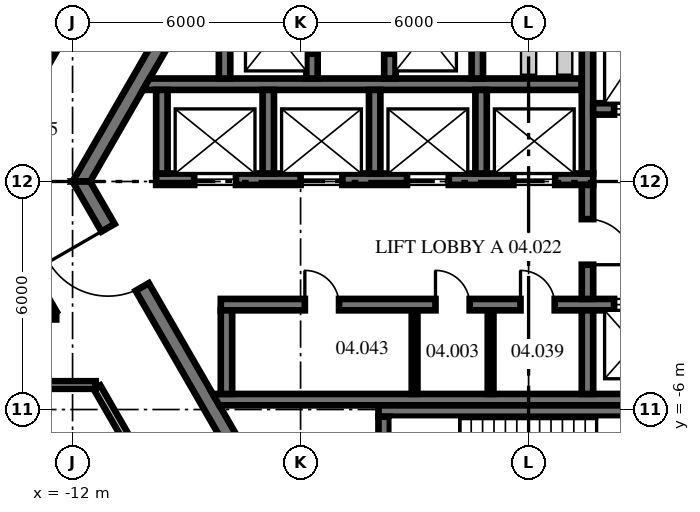
"""IFC4 building model, lengths in metres.
Left out: names, types, materials, properties, quantities, classifications, styles, units other than length and angle.
Written with IfcOpenShell. Run it as: python <this file> out.ifc"""

import sys

from ifc_helpers import new_model, si_unit, direction, frame, frame_2d, origin, place, context, subcontext, project, spatial, polyline, rectangle, outline, extrude, source, transform, mapped, element, fill, save


model = new_model("IFC4")
c1 = context("Model", 3, precision=1e-05, world=origin(), true_north=direction((0.0, 1.0)))
c2 = subcontext(c1, "Body", "Model", "MODEL_VIEW")
j1 = project(units=[si_unit("LENGTHUNIT", "METRE"), si_unit("PLANEANGLEUNIT", "RADIAN")], contexts=[c1])
p1 = place(None, origin())
s1 = spatial("IfcSite", under=j1, at=p1, CompositionType="ELEMENT")
p2 = place(p1, origin())
s2 = spatial("IfcBuilding", under=s1, at=p2, CompositionType="ELEMENT")
p3 = place(p2, frame((0.0, 0.0, 20.3)))
s3 = spatial("IfcBuildingStorey", under=s2, at=p3, CompositionType="ELEMENT", Elevation=20.3)
m1 = source(origin(), c2, "Body", "SweptSolid", [
    extrude(outline(polyline([(-0.115, -0.2), (11.885, -0.2), (11.654, 0.2), (0.115, 0.2), (-0.115, -0.2)])), origin(), (0.0, 0.0, 1.0), 4.1),
])
p4 = place(p3, frame((-5.885, 10.192, 0.0), z_axis=(0.0, 0.0, 1.0), x_axis=(-0.499996592174, -0.866027371285, 0.0)))
e1 = element("IfcWall", 1, at=p4, inside=s3, PredefinedType="SHEAR", context=c2, shape_type="MappedRepresentation", body=[
    mapped(m1, transform((0.0, 0.0, 0.0), scale=1.0)),
])
p5 = place(p4, frame((3.185, 0.0, 0.0)))
e2 = element("IfcOpeningElement", 2, at=p5, cuts=e1, PredefinedType="OPENING", context=c2, shape_type="SweptSolid", body=[
    extrude(rectangle(XDim=1.2, YDim=2.1, at=frame_2d((0.6, 1.05))), frame((0.0, 0.21, 0.0), z_axis=(0.0, -1.0, 0.0), x_axis=(1.0, 0.0, 0.0)), (0.0, 0.0, 1.0), 0.42),
])
p6 = place(p3, frame((-11.769, 0.0, 0.0), z_axis=(0.0, 0.0, 1.0), x_axis=(0.499996592174, -0.866027371285, 0.0)))
e3 = element("IfcWall", 3, at=p6, inside=s3, PredefinedType="SHEAR", context=c2, shape_type="MappedRepresentation", body=[
    mapped(m1, transform((0.0, 0.0, 0.0), scale=1.0)),
])
p7 = place(p6, frame((1.405, 0.0, 0.0)))
e4 = element("IfcOpeningElement", 4, at=p7, cuts=e3, PredefinedType="OPENING", context=c2, shape_type="SweptSolid", body=[
    extrude(rectangle(XDim=1.8, YDim=2.1, at=frame_2d((0.9, 1.05))), frame((0.0, 0.21, 0.0), z_axis=(0.0, -1.0, 0.0), x_axis=(1.0, 0.0, 0.0)), (0.0, 0.0, 1.0), 0.42),
])
p8 = place(p6, frame((7.915, 0.0, 0.0)))
e5 = element("IfcOpeningElement", 5, at=p8, cuts=e3, PredefinedType="OPENING", context=c2, shape_type="SweptSolid", body=[
    extrude(rectangle(XDim=1.2, YDim=2.1, at=frame_2d((0.6, 1.05))), frame((0.0, 0.21, 0.0), z_axis=(0.0, -1.0, 0.0), x_axis=(1.0, 0.0, 0.0)), (0.0, 0.0, 1.0), 0.42),
])
m2 = source(origin(), c2, "Body", "SweptSolid", [
    extrude(rectangle(XDim=11.5, YDim=0.3, at=frame_2d((5.75, 0.0))), origin(), (0.0, 0.0, 1.0), 4.1),
])
p9 = place(p3, frame((-9.8, 0.06, 0.0), z_axis=(0.0, 0.0, 1.0), x_axis=(1.0, 0.0, 0.0)))
e6 = element("IfcWall", 6, at=p9, inside=s3, PredefinedType="SHEAR", context=c2, shape_type="MappedRepresentation", body=[
    mapped(m2, transform((0.0, 0.0, 0.0), scale=1.0)),
])
p10 = place(p9, frame((1.0, 0.0, 0.0)))
e7 = element("IfcOpeningElement", 7, at=p10, cuts=e6, PredefinedType="OPENING", context=c2, shape_type="SweptSolid", body=[
    extrude(rectangle(XDim=1.1, YDim=2.1, at=frame_2d((0.55, 1.05))), frame((0.0, 0.16, 0.0), z_axis=(0.0, -1.0, 0.0), x_axis=(1.0, 0.0, 0.0)), (0.0, 0.0, 1.0), 0.32),
])
p11 = place(p9, frame((3.8, 0.0, 0.0)))
e8 = element("IfcOpeningElement", 8, at=p11, cuts=e6, PredefinedType="OPENING", context=c2, shape_type="SweptSolid", body=[
    extrude(rectangle(XDim=1.1, YDim=2.1, at=frame_2d((0.55, 1.05))), frame((0.0, 0.16, 0.0), z_axis=(0.0, -1.0, 0.0), x_axis=(1.0, 0.0, 0.0)), (0.0, 0.0, 1.0), 0.32),
])
p12 = place(p9, frame((6.6, 0.0, 0.0)))
e9 = element("IfcOpeningElement", 9, at=p12, cuts=e6, PredefinedType="OPENING", context=c2, shape_type="SweptSolid", body=[
    extrude(rectangle(XDim=1.1, YDim=2.1, at=frame_2d((0.55, 1.05))), frame((0.0, 0.16, 0.0), z_axis=(0.0, -1.0, 0.0), x_axis=(1.0, 0.0, 0.0)), (0.0, 0.0, 1.0), 0.32),
])
p13 = place(p9, frame((9.4, 0.0, 0.0)))
e10 = element("IfcOpeningElement", 10, at=p13, cuts=e6, PredefinedType="OPENING", context=c2, shape_type="SweptSolid", body=[
    extrude(rectangle(XDim=1.1, YDim=2.1, at=frame_2d((0.55, 1.05))), frame((0.0, 0.16, 0.0), z_axis=(0.0, -1.0, 0.0), x_axis=(1.0, 0.0, 0.0)), (0.0, 0.0, 1.0), 0.32),
])
m3 = source(origin(), c2, "Body", "SweptSolid", [
    extrude(outline(polyline([(11.2, -0.15), (-0.349, -0.15), (-0.176, 0.15), (11.2, 0.15), (11.2, -0.15)])), origin(), (0.0, 0.0, 1.0), 4.1),
])
p14 = place(p3, frame((-9.8, 2.56, 0.0), z_axis=(0.0, 0.0, 1.0), x_axis=(1.0, 0.0, 0.0)))
e11 = element("IfcWall", 11, at=p14, inside=s3, PredefinedType="SHEAR", context=c2, shape_type="MappedRepresentation", body=[
    mapped(m3, transform((0.0, 0.0, 0.0), scale=1.0)),
])
m4 = source(origin(), c2, "Body", "SweptSolid", [
    extrude(rectangle(XDim=4.45, YDim=0.3, at=frame_2d((2.225, 0.0))), origin(), (0.0, 0.0, 1.0), 4.1),
])
p15 = place(p3, frame((1.55, 0.21, 0.0), z_axis=(0.0, 0.0, 1.0), x_axis=(0.0, 1.0, 0.0)))
e12 = element("IfcWall", 12, at=p15, inside=s3, PredefinedType="SHEAR", context=c2, shape_type="MappedRepresentation", body=[
    mapped(m4, transform((0.0, 0.0, 0.0), scale=1.0)),
])
m5 = source(origin(), c2, "Body", "SweptSolid", [
    extrude(rectangle(XDim=3.0, YDim=0.3, at=frame_2d((1.5, 0.0))), origin(), (0.0, 0.0, 1.0), 4.1),
])
p16 = place(p3, frame((1.7, 1.91, 0.0), z_axis=(0.0, 0.0, 1.0), x_axis=(1.0, 0.0, 0.0)))
e13 = element("IfcWall", 13, at=p16, inside=s3, PredefinedType="SHEAR", context=c2, shape_type="MappedRepresentation", body=[
    mapped(m5, transform((0.0, 0.0, 0.0), scale=1.0)),
])
p17 = place(p16, frame((0.55, 0.0, 0.0)))
e14 = element("IfcOpeningElement", 14, at=p17, cuts=e13, PredefinedType="OPENING", context=c2, shape_type="SweptSolid", body=[
    extrude(rectangle(XDim=1.1, YDim=2.1, at=frame_2d((0.55, 1.05))), frame((0.0, 0.16, 0.0), z_axis=(0.0, -1.0, 0.0), x_axis=(1.0, 0.0, 0.0)), (0.0, 0.0, 1.0), 0.32),
])
m6 = source(origin(), c2, "Body", "SweptSolid", [
    extrude(rectangle(XDim=12.8, YDim=0.3, at=frame_2d((6.4, 0.0))), origin(), (0.0, 0.0, 1.0), 4.1),
])
p18 = place(p3, frame((-8.1, -3.24, 0.0), z_axis=(0.0, 0.0, 1.0), x_axis=(1.0, 0.0, 0.0)))
e15 = element("IfcWall", 15, at=p18, inside=s3, PredefinedType="SHEAR", context=c2, shape_type="MappedRepresentation", body=[
    mapped(m6, transform((0.0, 0.0, 0.0), scale=1.0)),
])
p19 = place(p18, frame((2.212, 0.0, 0.0)))
e16 = element("IfcOpeningElement", 16, at=p19, cuts=e15, PredefinedType="OPENING", context=c2, shape_type="SweptSolid", body=[
    extrude(rectangle(XDim=0.9, YDim=2.1, at=frame_2d((0.45, 1.05))), frame((0.0, 0.16, 0.0), z_axis=(0.0, -1.0, 0.0), x_axis=(1.0, 0.0, 0.0)), (0.0, 0.0, 1.0), 0.32),
])
p20 = place(p18, frame((5.65, 0.0, 0.0)))
e17 = element("IfcOpeningElement", 17, at=p20, cuts=e15, PredefinedType="OPENING", context=c2, shape_type="SweptSolid", body=[
    extrude(rectangle(XDim=0.9, YDim=2.1, at=frame_2d((0.45, 1.05))), frame((0.0, 0.16, 0.0), z_axis=(0.0, -1.0, 0.0), x_axis=(1.0, 0.0, 0.0)), (0.0, 0.0, 1.0), 0.32),
])
p21 = place(p18, frame((7.887, 0.0, 0.0)))
e18 = element("IfcOpeningElement", 18, at=p21, cuts=e15, PredefinedType="OPENING", context=c2, shape_type="SweptSolid", body=[
    extrude(rectangle(XDim=0.9, YDim=2.1, at=frame_2d((0.45, 1.05))), frame((0.0, 0.16, 0.0), z_axis=(0.0, -1.0, 0.0), x_axis=(1.0, 0.0, 0.0)), (0.0, 0.0, 1.0), 0.32),
])
p22 = place(p18, frame((10.35, 0.0, 0.0)))
e19 = element("IfcOpeningElement", 19, at=p22, cuts=e15, PredefinedType="OPENING", context=c2, shape_type="SweptSolid", body=[
    extrude(rectangle(XDim=1.1, YDim=2.1, at=frame_2d((0.55, 1.05))), frame((0.0, 0.16, 0.0), z_axis=(0.0, -1.0, 0.0), x_axis=(1.0, 0.0, 0.0)), (0.0, 0.0, 1.0), 0.32),
])
m7 = source(origin(), c2, "Body", "SweptSolid", [
    extrude(outline(polyline([(12.0, -0.15), (-0.04, -0.15), (-0.213, 0.15), (12.0, 0.15), (12.0, -0.15)])), origin(), (0.0, 0.0, 1.0), 4.1),
])
p23 = place(p3, frame((-8.1, -5.74, 0.0), z_axis=(0.0, 0.0, 1.0), x_axis=(1.0, 0.0, 0.0)))
e20 = element("IfcWall", 20, at=p23, inside=s3, PredefinedType="SHEAR", context=c2, shape_type="MappedRepresentation", body=[
    mapped(m7, transform((0.0, 0.0, 0.0), scale=1.0)),
])
m8 = source(origin(), c2, "Body", "SweptSolid", [
    extrude(rectangle(XDim=2.2, YDim=0.3, at=frame_2d((1.1, 0.0))), origin(), (0.0, 0.0, 1.0), 4.1),
])
p24 = place(p3, frame((-7.95, -5.59, 0.0), z_axis=(0.0, 0.0, 1.0), x_axis=(0.0, 1.0, 0.0)))
e21 = element("IfcWall", 21, at=p24, inside=s3, PredefinedType="SHEAR", context=c2, shape_type="MappedRepresentation", body=[
    mapped(m8, transform((0.0, 0.0, 0.0), scale=1.0)),
])
m9 = source(origin(), c2, "Body", "SweptSolid", [
    extrude(rectangle(XDim=2.2, YDim=0.3, at=frame_2d((1.1, 0.0))), origin(), (0.0, 0.0, 1.0), 4.1),
])
p25 = place(p3, frame((-9.65, 0.21, 0.0), z_axis=(0.0, 0.0, 1.0), x_axis=(0.0, 1.0, 0.0)))
e22 = element("IfcWall", 22, at=p25, inside=s3, PredefinedType="SHEAR", context=c2, shape_type="MappedRepresentation", body=[
    mapped(m9, transform((0.0, 0.0, 0.0), scale=1.0)),
])
p26 = place(p3, frame((1.55, -5.59, 0.0), z_axis=(0.0, 0.0, 1.0), x_axis=(0.0, 1.0, 0.0)))
e23 = element("IfcWall", 23, at=p26, inside=s3, PredefinedType="SHEAR", context=c2, shape_type="MappedRepresentation", body=[
    mapped(m8, transform((0.0, 0.0, 0.0), scale=1.0)),
])
p27 = place(p3, frame((1.55, -3.09, 0.0), z_axis=(0.0, 0.0, 1.0), x_axis=(0.0, 1.0, 0.0)))
e24 = element("IfcWall", 24, at=p27, inside=s3, PredefinedType="SHEAR", context=c2, shape_type="MappedRepresentation", body=[
    mapped(m5, transform((0.0, 0.0, 0.0), scale=1.0)),
])
p28 = place(p27, frame((0.9, 0.0, 0.0)))
e25 = element("IfcOpeningElement", 25, at=p28, cuts=e24, PredefinedType="OPENING", context=c2, shape_type="SweptSolid", body=[
    extrude(rectangle(XDim=1.2, YDim=2.1, at=frame_2d((0.6, 1.05))), frame((0.0, 0.16, 0.0), z_axis=(0.0, -1.0, 0.0), x_axis=(1.0, 0.0, 0.0)), (0.0, 0.0, 1.0), 0.32),
])
m10 = source(origin(), c2, "Body", "SweptSolid", [
    extrude(outline(polyline([(0.0, -0.15), (8.95, -0.15), (8.65, 0.15), (0.0, 0.15), (0.0, -0.15)])), origin(), (0.0, 0.0, 1.0), 4.1),
])
p29 = place(p3, frame((-3.95, -6.04, 0.0), z_axis=(0.0, 0.0, 1.0), x_axis=(1.0, 0.0, 0.0)))
e26 = element("IfcWall", 26, at=p29, inside=s3, PredefinedType="SHEAR", context=c2, shape_type="MappedRepresentation", body=[
    mapped(m10, transform((0.0, 0.0, 0.0), scale=1.0)),
])
m11 = source(origin(), c2, "Body", "SweptSolid", [
    extrude(outline(polyline([(3.8, -0.15), (-0.004, -0.15), (-0.004, 0.15), (3.8, 0.15), (3.8, -0.15)])), origin(), (0.0, 0.0, 1.0), 4.1),
])
p30 = place(p3, frame((-3.8, -9.99, 0.0), z_axis=(0.0, 0.0, 1.0), x_axis=(0.0, 1.0, 0.0)))
e27 = element("IfcWall", 27, at=p30, inside=s3, PredefinedType="SHEAR", context=c2, shape_type="MappedRepresentation", body=[
    mapped(m11, transform((0.0, 0.0, 0.0), scale=1.0)),
])
m12 = source(origin(), c2, "Body", "SweptSolid", [
    extrude(rectangle(XDim=2.4, YDim=0.3, at=frame_2d((1.2, 0.0))), origin(), (0.0, 0.0, 1.0), 4.1),
])
p31 = place(p3, frame((-8.0, 2.71, 0.0), z_axis=(0.0, 0.0, 1.0), x_axis=(0.0, 1.0, 0.0)))
e28 = element("IfcWall", 28, at=p31, inside=s3, PredefinedType="SHEAR", context=c2, shape_type="MappedRepresentation", body=[
    mapped(m12, transform((0.0, 0.0, 0.0), scale=1.0)),
])
p32 = place(p3, frame((-5.7, 2.71, 0.0), z_axis=(0.0, 0.0, 1.0), x_axis=(0.0, 1.0, 0.0)))
e29 = element("IfcWall", 29, at=p32, inside=s3, PredefinedType="SHEAR", context=c2, shape_type="MappedRepresentation", body=[
    mapped(m12, transform((0.0, 0.0, 0.0), scale=1.0)),
])
p33 = place(p32, frame((0.65, 0.0, 0.0)))
e30 = element("IfcOpeningElement", 30, at=p33, cuts=e29, PredefinedType="OPENING", context=c2, shape_type="SweptSolid", body=[
    extrude(rectangle(XDim=1.1, YDim=2.1, at=frame_2d((0.55, 1.05))), frame((0.0, 0.16, 0.0), z_axis=(0.0, -1.0, 0.0), x_axis=(1.0, 0.0, 0.0)), (0.0, 0.0, 1.0), 0.32),
])
p34 = place(p3, frame((-3.65, 2.71, 0.0), z_axis=(0.0, 0.0, 1.0), x_axis=(0.0, 1.0, 0.0)))
e31 = element("IfcWall", 31, at=p34, inside=s3, PredefinedType="SHEAR", context=c2, shape_type="MappedRepresentation", body=[
    mapped(m12, transform((0.0, 0.0, 0.0), scale=1.0)),
])
p35 = place(p34, frame((0.65, 0.0, 0.0)))
e32 = element("IfcOpeningElement", 32, at=p35, cuts=e31, PredefinedType="OPENING", context=c2, shape_type="SweptSolid", body=[
    extrude(rectangle(XDim=1.1, YDim=2.1, at=frame_2d((0.55, 1.05))), frame((0.0, 0.16, 0.0), z_axis=(0.0, -1.0, 0.0), x_axis=(1.0, 0.0, 0.0)), (0.0, 0.0, 1.0), 0.32),
])
p36 = place(p3, frame((-1.35, 2.71, 0.0), z_axis=(0.0, 0.0, 1.0), x_axis=(0.0, 1.0, 0.0)))
e33 = element("IfcWall", 33, at=p36, inside=s3, PredefinedType="SHEAR", context=c2, shape_type="MappedRepresentation", body=[
    mapped(m12, transform((0.0, 0.0, 0.0), scale=1.0)),
])
for number, where, z_axis, x_axis in (
    (34, (-6.85, 0.21, 0.0), (0.0, 0.0, 1.0), (0.0, 1.0, 0.0)),
    (35, (-4.05, 0.21, 0.0), (0.0, 0.0, 1.0), (0.0, 1.0, 0.0)),
    (36, (-1.25, 0.21, 0.0), (0.0, 0.0, 1.0), (0.0, 1.0, 0.0)),
):
    element("IfcWall", number, at=place(p3, frame(where, z_axis=z_axis, x_axis=x_axis)), inside=s3, PredefinedType="SHEAR", context=c2, shape_type="MappedRepresentation", body=[
        mapped(m9, transform((0.0, 0.0, 0.0), scale=1.0)),
    ])
m13 = source(origin(), c2, "Body", "SweptSolid", [
    extrude(rectangle(XDim=2.2, YDim=0.15, at=frame_2d((1.1, 0.0))), origin(), (0.0, 0.0, 1.0), 4.1),
])
for number, where, z_axis, x_axis in (
    (37, (-3.0, -5.59, 0.0), (0.0, 0.0, 1.0), (0.0, 1.0, 0.0)),
    (38, (-1.0, -5.59, 0.0), (0.0, 0.0, 1.0), (0.0, 1.0, 0.0)),
):
    element("IfcWall", number, at=place(p3, frame(where, z_axis=z_axis, x_axis=x_axis)), inside=s3, PredefinedType="PARTITIONING", context=c2, shape_type="MappedRepresentation", body=[
        mapped(m13, transform((0.0, 0.0, 0.0), scale=1.0)),
    ])
m14 = source(origin(), c2, "Body", "SweptSolid", [
    extrude(rectangle(XDim=3.945, YDim=0.15, at=frame_2d((1.973, 0.0))), origin(), (0.0, 0.0, 1.0), 4.1),
])
p37 = place(p3, frame((-14.458, -0.043, 0.0), z_axis=(0.0, 0.0, 1.0), x_axis=(0.499979592829, -0.866037185549, 0.0)))
e39 = element("IfcWall", 39, at=p37, inside=s3, PredefinedType="PARTITIONING", context=c2, shape_type="MappedRepresentation", body=[
    mapped(m14, transform((0.0, 0.0, 0.0), scale=1.0)),
])
m15 = source(origin(), c2, "Body", "SweptSolid", [
    extrude(rectangle(XDim=8.229, YDim=0.2, at=frame_2d((4.115, 0.0))), origin(), (0.0, 0.0, 1.0), 4.1),
])
p38 = place(p3, frame((-11.356, -5.416, 0.0), z_axis=(0.0, 0.0, 1.0), x_axis=(0.500012644715, -0.866018103232, 0.0)))
e40 = element("IfcWall", 40, at=p38, inside=s3, PredefinedType="PARTITIONING", context=c2, shape_type="MappedRepresentation", body=[
    mapped(m15, transform((0.0, 0.0, 0.0), scale=1.0)),
])
m16 = source(origin(), c2, "Body", "SweptSolid", [
    extrude(rectangle(XDim=20.193, YDim=0.2, at=frame_2d((10.097, 0.0))), origin(), (0.0, 0.0, 1.0), 4.1),
])
p39 = place(p3, frame((-31.584, -5.355, 0.0), z_axis=(0.0, 0.0, 1.0), x_axis=(1.0, 0.0, 0.0)))
e41 = element("IfcWall", 41, at=p39, inside=s3, PredefinedType="PARTITIONING", context=c2, shape_type="MappedRepresentation", body=[
    mapped(m16, transform((0.0, 0.0, 0.0), scale=1.0)),
])
p40 = place(p39, frame((9.548, 0.0, 0.0)))
e42 = element("IfcOpeningElement", 42, at=p40, cuts=e41, PredefinedType="OPENING", context=c2, shape_type="SweptSolid", body=[
    extrude(rectangle(XDim=1.0, YDim=2.1, at=frame_2d((0.5, 1.05))), frame((0.0, 0.11, 0.0), z_axis=(0.0, -1.0, 0.0), x_axis=(1.0, 0.0, 0.0)), (0.0, 0.0, 1.0), 0.22),
])
m17 = source(origin(), c2, "Body", "SweptSolid", [
    extrude(rectangle(XDim=11.547, YDim=0.15, at=frame_2d((5.773, 0.0))), origin(), (0.0, 0.0, 1.0), 4.1),
])
p41 = place(p3, frame((-23.977, -3.555, 0.0), z_axis=(0.0, 0.0, 1.0), x_axis=(1.0, 0.0, 0.0)))
e43 = element("IfcWall", 43, at=p41, inside=s3, PredefinedType="PARTITIONING", context=c2, shape_type="MappedRepresentation", body=[
    mapped(m17, transform((0.0, 0.0, 0.0), scale=1.0)),
])
p42 = place(p41, frame((5.997, 0.0, 0.0)))
e44 = element("IfcOpeningElement", 44, at=p42, cuts=e43, PredefinedType="OPENING", context=c2, shape_type="SweptSolid", body=[
    extrude(rectangle(XDim=0.9, YDim=2.1, at=frame_2d((0.45, 1.05))), frame((0.0, 0.085, 0.0), z_axis=(0.0, -1.0, 0.0), x_axis=(1.0, 0.0, 0.0)), (0.0, 0.0, 1.0), 0.17),
])
m18 = source(origin(), c2, "Body", "SweptSolid", [
    extrude(rectangle(XDim=4.111, YDim=0.15, at=frame_2d((2.056, 0.0))), origin(), (0.0, 0.0, 1.0), 4.1),
])
p43 = place(p3, frame((-14.473, 0.017, 0.0), z_axis=(0.0, 0.0, 1.0), x_axis=(0.500022314862, 0.866012519909, 0.0)))
e45 = element("IfcWall", 45, at=p43, inside=s3, PredefinedType="PARTITIONING", context=c2, shape_type="MappedRepresentation", body=[
    mapped(m18, transform((0.0, 0.0, 0.0), scale=1.0)),
])
p44 = place(p43, frame((1.625, 0.0, 0.0)))
e46 = element("IfcOpeningElement", 46, at=p44, cuts=e45, PredefinedType="OPENING", context=c2, shape_type="SweptSolid", body=[
    extrude(rectangle(XDim=0.9, YDim=2.1, at=frame_2d((0.45, 1.05))), frame((0.0, 0.085, 0.0), z_axis=(0.0, -1.0, 0.0), x_axis=(1.0, 0.0, 0.0)), (0.0, 0.0, 1.0), 0.17),
])
p45 = place(p7, frame((1.8, 0.0, 0.0), z_axis=(0.0, 0.0, 1.0), x_axis=(-1.0, 0.0, 0.0)))
e47 = element("IfcDoor", 47, at=p45, inside=s3, OperationType="DOUBLE_DOOR_DOUBLE_SWING", PredefinedType="DOOR", context=c2, shape_type="SweptSolid", body=[
    extrude(rectangle(XDim=1.8, YDim=2.1, at=frame_2d((0.9, 1.05))), frame((0.0, 0.025, 0.0), z_axis=(0.0, -1.0, 0.0), x_axis=(1.0, 0.0, 0.0)), (0.0, 0.0, 1.0), 0.05),
])
fill(e4, e47)
p46 = place(p28, frame((1.2, 0.0, 0.0), z_axis=(0.0, 0.0, 1.0), x_axis=(-1.0, 0.0, 0.0)))
e48 = element("IfcDoor", 48, at=p46, inside=s3, OperationType="SINGLE_SWING_RIGHT", PredefinedType="DOOR", context=c2, shape_type="SweptSolid", body=[
    extrude(rectangle(XDim=1.2, YDim=2.1, at=frame_2d((0.6, 1.05))), frame((0.0, 0.025, 0.0), z_axis=(0.0, -1.0, 0.0), x_axis=(1.0, 0.0, 0.0)), (0.0, 0.0, 1.0), 0.05),
])
fill(e25, e48)
p47 = place(p19, origin())
e49 = element("IfcDoor", 49, at=p47, inside=s3, OperationType="SINGLE_SWING_LEFT", PredefinedType="DOOR", context=c2, shape_type="SweptSolid", body=[
    extrude(rectangle(XDim=0.9, YDim=2.1, at=frame_2d((0.45, 1.05))), frame((0.0, 0.025, 0.0), z_axis=(0.0, -1.0, 0.0), x_axis=(1.0, 0.0, 0.0)), (0.0, 0.0, 1.0), 0.05),
])
fill(e16, e49)
p48 = place(p20, origin())
e50 = element("IfcDoor", 50, at=p48, inside=s3, OperationType="SINGLE_SWING_LEFT", PredefinedType="DOOR", context=c2, shape_type="SweptSolid", body=[
    extrude(rectangle(XDim=0.9, YDim=2.1, at=frame_2d((0.45, 1.05))), frame((0.0, 0.025, 0.0), z_axis=(0.0, -1.0, 0.0), x_axis=(1.0, 0.0, 0.0)), (0.0, 0.0, 1.0), 0.05),
])
fill(e17, e50)
p49 = place(p21, origin())
e51 = element("IfcDoor", 51, at=p49, inside=s3, OperationType="SINGLE_SWING_LEFT", PredefinedType="DOOR", context=c2, shape_type="SweptSolid", body=[
    extrude(rectangle(XDim=0.9, YDim=2.1, at=frame_2d((0.45, 1.05))), frame((0.0, 0.025, 0.0), z_axis=(0.0, -1.0, 0.0), x_axis=(1.0, 0.0, 0.0)), (0.0, 0.0, 1.0), 0.05),
])
fill(e18, e51)
p50 = place(p10, origin())
e52 = element("IfcDoor", 52, at=p50, inside=s3, OperationType="DOUBLE_DOOR_SLIDING", PredefinedType="DOOR", context=c2, shape_type="SweptSolid", body=[
    extrude(rectangle(XDim=1.1, YDim=2.1, at=frame_2d((0.55, 1.05))), frame((0.0, 0.025, 0.0), z_axis=(0.0, -1.0, 0.0), x_axis=(1.0, 0.0, 0.0)), (0.0, 0.0, 1.0), 0.05),
])
fill(e7, e52)
p51 = place(p11, origin())
e53 = element("IfcDoor", 53, at=p51, inside=s3, OperationType="DOUBLE_DOOR_SLIDING", PredefinedType="DOOR", context=c2, shape_type="SweptSolid", body=[
    extrude(rectangle(XDim=1.1, YDim=2.1, at=frame_2d((0.55, 1.05))), frame((0.0, 0.025, 0.0), z_axis=(0.0, -1.0, 0.0), x_axis=(1.0, 0.0, 0.0)), (0.0, 0.0, 1.0), 0.05),
])
fill(e8, e53)
p52 = place(p12, origin())
e54 = element("IfcDoor", 54, at=p52, inside=s3, OperationType="DOUBLE_DOOR_SLIDING", PredefinedType="DOOR", context=c2, shape_type="SweptSolid", body=[
    extrude(rectangle(XDim=1.1, YDim=2.1, at=frame_2d((0.55, 1.05))), frame((0.0, 0.025, 0.0), z_axis=(0.0, -1.0, 0.0), x_axis=(1.0, 0.0, 0.0)), (0.0, 0.0, 1.0), 0.05),
])
fill(e9, e54)
p53 = place(p13, origin())
e55 = element("IfcDoor", 55, at=p53, inside=s3, OperationType="DOUBLE_DOOR_SLIDING", PredefinedType="DOOR", context=c2, shape_type="SweptSolid", body=[
    extrude(rectangle(XDim=1.1, YDim=2.1, at=frame_2d((0.55, 1.05))), frame((0.0, 0.025, 0.0), z_axis=(0.0, -1.0, 0.0), x_axis=(1.0, 0.0, 0.0)), (0.0, 0.0, 1.0), 0.05),
])
fill(e10, e55)
p54 = place(p17, origin())
e56 = element("IfcDoor", 56, at=p54, inside=s3, OperationType="DOUBLE_DOOR_SLIDING", PredefinedType="DOOR", context=c2, shape_type="SweptSolid", body=[
    extrude(rectangle(XDim=1.1, YDim=2.1, at=frame_2d((0.55, 1.05))), frame((0.0, 0.025, 0.0), z_axis=(0.0, -1.0, 0.0), x_axis=(1.0, 0.0, 0.0)), (0.0, 0.0, 1.0), 0.05),
])
fill(e14, e56)
p55 = place(p22, origin())
e57 = element("IfcDoor", 57, at=p55, inside=s3, OperationType="DOUBLE_DOOR_SLIDING", PredefinedType="DOOR", context=c2, shape_type="SweptSolid", body=[
    extrude(rectangle(XDim=1.1, YDim=2.1, at=frame_2d((0.55, 1.05))), frame((0.0, 0.025, 0.0), z_axis=(0.0, -1.0, 0.0), x_axis=(1.0, 0.0, 0.0)), (0.0, 0.0, 1.0), 0.05),
])
fill(e19, e57)
p56 = place(p33, origin())
e58 = element("IfcDoor", 58, at=p56, inside=s3, OperationType="DOUBLE_DOOR_SLIDING", PredefinedType="DOOR", context=c2, shape_type="SweptSolid", body=[
    extrude(rectangle(XDim=1.1, YDim=2.1, at=frame_2d((0.55, 1.05))), frame((0.0, 0.025, 0.0), z_axis=(0.0, -1.0, 0.0), x_axis=(1.0, 0.0, 0.0)), (0.0, 0.0, 1.0), 0.05),
])
fill(e30, e58)
p57 = place(p35, origin())
e59 = element("IfcDoor", 59, at=p57, inside=s3, OperationType="DOUBLE_DOOR_SLIDING", PredefinedType="DOOR", context=c2, shape_type="SweptSolid", body=[
    extrude(rectangle(XDim=1.1, YDim=2.1, at=frame_2d((0.55, 1.05))), frame((0.0, 0.025, 0.0), z_axis=(0.0, -1.0, 0.0), x_axis=(1.0, 0.0, 0.0)), (0.0, 0.0, 1.0), 0.05),
])
fill(e32, e59)
save(model, sys.argv[1])
